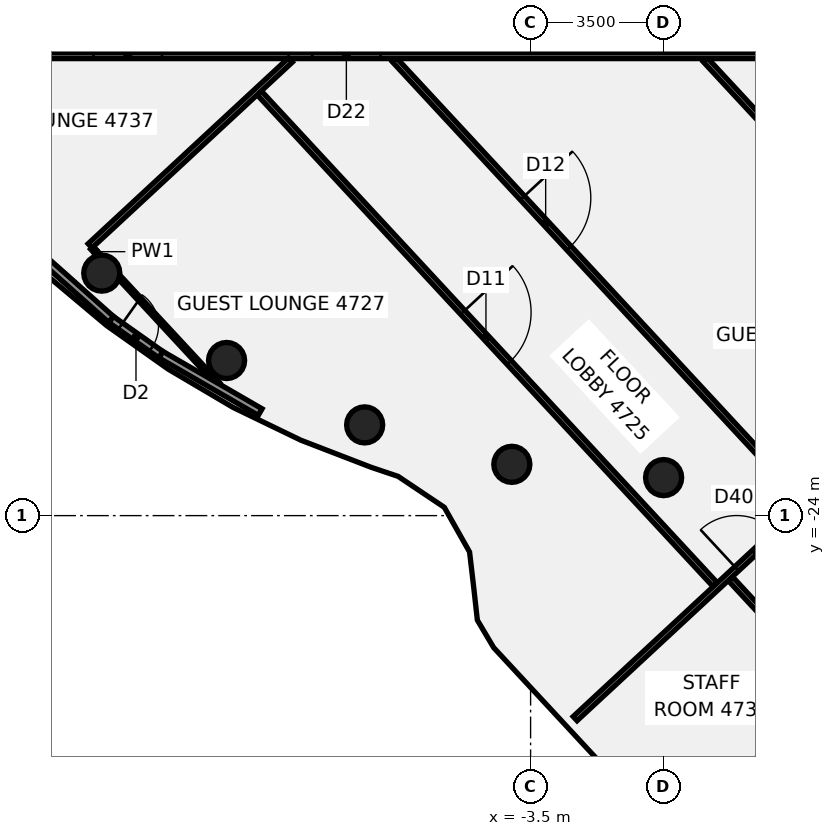
"""IFC4 building model, lengths in metres.
Left out: names, types, materials, properties, quantities, classifications, styles, units other than length and angle.
Written with IfcOpenShell. Run it as: python <this file> out.ifc"""

import sys

from ifc_helpers import new_model, si_unit, direction, frame, frame_2d, origin, origin_2d, place, context, subcontext, project, spatial, rectangle, circle, extrude, element, fill, save


model = new_model("IFC4")
c1 = context("Model", 3, precision=1e-05, world=origin(), true_north=direction((0.0, 1.0)))
c2 = subcontext(c1, "Body", "Model", "MODEL_VIEW")
j1 = project(units=[si_unit("LENGTHUNIT", "METRE"), si_unit("PLANEANGLEUNIT", "RADIAN")], contexts=[c1])
p1 = place(None, origin())
s1 = spatial("IfcSite", under=j1, at=p1, CompositionType="ELEMENT")
p2 = place(p1, origin())
s2 = spatial("IfcBuilding", under=s1, at=p2, CompositionType="ELEMENT")
p3 = place(p2, frame((0.0, 0.0, 189.7)))
s3 = spatial("IfcBuildingStorey", under=s2, at=p3, CompositionType="ELEMENT", Elevation=189.7)
for number, where, z_axis, x_axis in (
    (1, (-14.784, -17.619, -0.14), (0.0, 0.0, 1.0), (1.0, 0.0, 0.0)),
    (2, (-11.5, -19.919, -0.14), (0.0, 0.0, 1.0), (1.0, 0.0, 0.0)),
    (3, (-7.866, -21.613, -0.14), (0.0, 0.0, 1.0), (1.0, 0.0, 0.0)),
    (4, (-3.994, -22.651, -0.14), (0.0, 0.0, 1.0), (1.0, 0.0, 0.0)),
    (5, (0.0, -23.0, -0.14), (0.0, 0.0, 1.0), (1.0, 0.0, 0.0)),
):
    element("IfcColumn", number, at=place(p3, frame(where, z_axis=z_axis, x_axis=x_axis)), inside=s3, PredefinedType="COLUMN", context=c2, shape_type="SweptSolid", body=[
        extrude(circle(Radius=0.475, at=origin_2d()), origin(), (0.0, 0.0, 1.0), 3.6),
    ])
p4 = place(p3, frame((-15.041, -16.956, 0.0), z_axis=(0.0, 0.0, 1.0), x_axis=(0.679895310154, -0.733309189381, 0.0)))
e6 = element("IfcWall", 6, at=p4, inside=s3, PredefinedType="PARTITIONING", context=c2, shape_type="SweptSolid", body=[
    extrude(rectangle(XDim=0.27, YDim=0.1, at=frame_2d((0.135, 0.0))), origin(), (0.0, 0.0, 1.0), 2.864),
])
p5 = place(p3, frame((-14.328, -17.725, 0.0), z_axis=(0.0, 0.0, 1.0), x_axis=(0.679978080858, -0.733232438966, 0.0)))
e7 = element("IfcWall", 7, at=p5, inside=s3, PredefinedType="PARTITIONING", context=c2, shape_type="SweptSolid", body=[
    extrude(rectangle(XDim=3.842, YDim=0.1, at=frame_2d((1.921, 0.0))), origin(), (0.0, 0.0, 1.0), 2.864),
])
p6 = place(p3, frame((-10.638, -12.881, 0.0), z_axis=(0.0, 0.0, 1.0), x_axis=(0.679925356206, -0.733281330724, 0.0)))
e8 = element("IfcWall", 8, at=p6, inside=s3, PredefinedType="PARTITIONING", context=c2, shape_type="SweptSolid", body=[
    extrude(rectangle(XDim=17.639, YDim=0.15, at=frame_2d((8.82, 0.0))), origin(), (0.0, 0.0, 1.0), 2.864),
])
p7 = place(p6, frame((7.87, 0.0, 0.0)))
e9 = element("IfcOpeningElement", 9, at=p7, cuts=e8, PredefinedType="OPENING", context=c2, shape_type="SweptSolid", body=[
    extrude(rectangle(XDim=1.8, YDim=2.1, at=frame_2d((0.9, 1.05))), frame((0.0, 0.085, 0.0), z_axis=(0.0, -1.0, 0.0), x_axis=(1.0, 0.0, 0.0)), (0.0, 0.0, 1.0), 0.17),
])
p8 = place(p3, frame((-7.084, -12.006, 0.0), z_axis=(0.0, 0.0, 1.0), x_axis=(0.679912033417, -0.733293683877, 0.0)))
e10 = element("IfcWall", 10, at=p8, inside=s3, PredefinedType="PARTITIONING", context=c2, shape_type="SweptSolid", body=[
    extrude(rectangle(XDim=15.865, YDim=0.15, at=frame_2d((7.933, 0.0))), origin(), (0.0, 0.0, 1.0), 2.864),
])
p9 = place(p8, frame((4.955, 0.0, 0.0)))
e11 = element("IfcOpeningElement", 11, at=p9, cuts=e10, PredefinedType="OPENING", context=c2, shape_type="SweptSolid", body=[
    extrude(rectangle(XDim=1.8, YDim=2.1, at=frame_2d((0.9, 1.05))), frame((0.0, 0.085, 0.0), z_axis=(0.0, -1.0, 0.0), x_axis=(1.0, 0.0, 0.0)), (0.0, 0.0, 1.0), 0.17),
])
p10 = place(p3, frame((1.098, -12.006, 0.0), z_axis=(0.0, 0.0, 1.0), x_axis=(0.679949372444, -0.733259061255, 0.0)))
e12 = element("IfcWall", 12, at=p10, inside=s3, PredefinedType="PARTITIONING", context=c2, shape_type="SweptSolid", body=[
    extrude(rectangle(XDim=14.843, YDim=0.15, at=frame_2d((7.421, 0.0))), origin(), (0.0, 0.0, 1.0), 2.864),
])
p11 = place(p3, frame((1.758, -25.661, 0.0), z_axis=(0.0, 0.0, 1.0), x_axis=(0.679825753993, -0.733373672972, 0.0)))
e13 = element("IfcWall", 13, at=p11, inside=s3, PredefinedType="PARTITIONING", context=c2, shape_type="SweptSolid", body=[
    extrude(rectangle(XDim=3.88, YDim=0.15, at=frame_2d((1.94, 0.0))), origin(), (0.0, 0.0, 1.0), 2.864),
])
p12 = place(p11, frame((1.87, 0.0, 0.0)))
e14 = element("IfcOpeningElement", 14, at=p12, cuts=e13, PredefinedType="OPENING", context=c2, shape_type="SweptSolid", body=[
    extrude(rectangle(XDim=0.9, YDim=2.1, at=frame_2d((0.45, 1.05))), frame((0.0, 0.085, 0.0), z_axis=(0.0, -1.0, 0.0), x_axis=(1.0, 0.0, 0.0)), (0.0, 0.0, 1.0), 0.17),
])
p13 = place(p3, frame((-17.1, -11.9, 0.0), z_axis=(0.0, 0.0, 1.0), x_axis=(1.0, 0.0, 0.0)))
e15 = element("IfcWall", 15, at=p13, inside=s3, PredefinedType="PARTITIONING", context=c2, shape_type="SweptSolid", body=[
    extrude(rectangle(XDim=34.165, YDim=0.15, at=frame_2d((17.083, 0.0))), origin(), (0.0, 0.0, 1.0), 2.864),
])
p14 = place(p13, frame((7.852, 0.0, 0.0)))
e16 = element("IfcOpeningElement", 16, at=p14, cuts=e15, PredefinedType="OPENING", context=c2, shape_type="SweptSolid", body=[
    extrude(rectangle(XDim=1.8, YDim=2.1, at=frame_2d((0.9, 1.05))), frame((0.0, 0.085, 0.0), z_axis=(0.0, -1.0, 0.0), x_axis=(1.0, 0.0, 0.0)), (0.0, 0.0, 1.0), 0.17),
])
p15 = place(p13, frame((2.1, 0.0, 0.0)))
e17 = element("IfcOpeningElement", 17, at=p15, cuts=e15, PredefinedType="OPENING", context=c2, shape_type="SweptSolid", body=[
    extrude(rectangle(XDim=1.8, YDim=2.1, at=frame_2d((0.9, 1.05))), frame((0.0, 0.085, 0.0), z_axis=(0.0, -1.0, 0.0), x_axis=(1.0, 0.0, 0.0)), (0.0, 0.0, 1.0), 0.17),
])
p16 = place(p13, frame((25.149, 0.0, 0.0)))
e18 = element("IfcOpeningElement", 18, at=p16, cuts=e15, PredefinedType="OPENING", context=c2, shape_type="SweptSolid", body=[
    extrude(rectangle(XDim=1.8, YDim=2.1, at=frame_2d((0.9, 1.05))), frame((0.0, 0.085, 0.0), z_axis=(0.0, -1.0, 0.0), x_axis=(1.0, 0.0, 0.0)), (0.0, 0.0, 1.0), 0.17),
])
p17 = place(p3, frame((-15.092, -16.901, 0.0), z_axis=(0.0, 0.0, 1.0), x_axis=(0.733371254751, 0.67982836268, 0.0)))
e19 = element("IfcWall", 19, at=p17, inside=s3, PredefinedType="PARTITIONING", context=c2, shape_type="SweptSolid", body=[
    extrude(rectangle(XDim=7.191, YDim=0.15, at=frame_2d((3.595, 0.0))), origin(), (0.0, 0.0, 1.0), 2.864),
])
p18 = place(p3, frame((-2.328, -29.342, 0.0), z_axis=(0.0, 0.0, 1.0), x_axis=(0.73323547054, 0.679974811844, 0.0)))
e20 = element("IfcWall", 20, at=p18, inside=s3, PredefinedType="PARTITIONING", context=c2, shape_type="SweptSolid", body=[
    extrude(rectangle(XDim=14.219, YDim=0.15, at=frame_2d((7.11, 0.0))), origin(), (0.0, 0.0, 1.0), 2.864),
])
p19 = place(p18, frame((5.8, 0.0, 0.0)))
e21 = element("IfcOpeningElement", 21, at=p19, cuts=e20, PredefinedType="OPENING", context=c2, shape_type="SweptSolid", body=[
    extrude(rectangle(XDim=1.4, YDim=2.1, at=frame_2d((0.7, 1.05))), frame((0.0, 0.085, 0.0), z_axis=(0.0, -1.0, 0.0), x_axis=(1.0, 0.0, 0.0)), (0.0, 0.0, 1.0), 0.17),
])
p20 = place(p3, frame((-16.794, -16.83, 0.0), z_axis=(0.0, 0.0, 1.0), x_axis=(0.746918793399, -0.664915269841, 0.0)))
e22 = element("IfcWall", 22, at=p20, inside=s3, PredefinedType="SOLIDWALL", context=c2, shape_type="SweptSolid", body=[
    extrude(rectangle(XDim=3.022, YDim=0.2, at=frame_2d((1.511, 0.0))), origin(), (0.0, 0.0, 1.0), 3.46),
])
p21 = place(p3, frame((-13.231, -19.763, 0.0), z_axis=(0.0, 0.0, 1.0), x_axis=(0.865619895442, -0.500701704226, 0.0)))
e23 = element("IfcWall", 23, at=p21, inside=s3, PredefinedType="SOLIDWALL", context=c2, shape_type="SweptSolid", body=[
    extrude(rectangle(XDim=3.021, YDim=0.2, at=frame_2d((1.51, 0.0))), origin(), (0.0, 0.0, 1.0), 3.46),
])
p22 = place(p3, frame((-14.537, -18.839, 0.0), z_axis=(0.0, 0.0, 1.0), x_axis=(0.816282280001, -0.577653217212, 0.0)))
e24 = element("IfcWall", 24, at=p22, inside=s3, PredefinedType="SOLIDWALL", context=c2, shape_type="SweptSolid", body=[
    extrude(rectangle(XDim=1.6, YDim=0.2, at=frame_2d((0.8, 0.0))), origin(), (0.0, 0.0, 1.0), 3.46),
])
p23 = place(p22, frame((0.3, 0.0, 0.0)))
e25 = element("IfcOpeningElement", 25, at=p23, cuts=e24, PredefinedType="OPENING", context=c2, shape_type="SweptSolid", body=[
    extrude(rectangle(XDim=1.0, YDim=2.4, at=frame_2d((0.5, 1.2))), frame((0.0, 0.11, 0.0), z_axis=(0.0, -1.0, 0.0), x_axis=(1.0, 0.0, 0.0)), (0.0, 0.0, 1.0), 0.22),
])
p24 = place(p3, frame((1.998, -30.921, -0.14), z_axis=(0.0, 0.0, 1.0), x_axis=(0.733268848454, 0.679938817753, 0.0)))
e26 = element("IfcWall", 26, at=p24, inside=s3, PredefinedType="SHEAR", context=c2, shape_type="SweptSolid", body=[
    extrude(rectangle(XDim=3.2, YDim=0.2, at=frame_2d((1.6, 0.0))), origin(), (0.0, 0.0, 1.0), 3.004),
])
p25 = place(p7, frame((1.8, 0.0, 0.0), z_axis=(0.0, 0.0, 1.0), x_axis=(-1.0, 0.0, 0.0)))
e27 = element("IfcDoor", 27, at=p25, inside=s3, OperationType="DOUBLE_DOOR_SINGLE_SWING", PredefinedType="DOOR", context=c2, shape_type="SweptSolid", body=[
    extrude(rectangle(XDim=1.8, YDim=2.1, at=frame_2d((0.9, 1.05))), frame((0.0, 0.025, 0.0), z_axis=(0.0, -1.0, 0.0), x_axis=(1.0, 0.0, 0.0)), (0.0, 0.0, 1.0), 0.05),
])
fill(e9, e27)
p26 = place(p9, origin())
e28 = element("IfcDoor", 28, at=p26, inside=s3, OperationType="DOUBLE_DOOR_SINGLE_SWING", PredefinedType="DOOR", context=c2, shape_type="SweptSolid", body=[
    extrude(rectangle(XDim=1.8, YDim=2.1, at=frame_2d((0.9, 1.05))), frame((0.0, 0.025, 0.0), z_axis=(0.0, -1.0, 0.0), x_axis=(1.0, 0.0, 0.0)), (0.0, 0.0, 1.0), 0.05),
])
fill(e11, e28)
p27 = place(p14, origin())
e29 = element("IfcDoor", 29, at=p27, inside=s3, OperationType="DOUBLE_DOOR_SINGLE_SWING", PredefinedType="DOOR", context=c2, shape_type="SweptSolid", body=[
    extrude(rectangle(XDim=1.8, YDim=2.1, at=frame_2d((0.9, 1.05))), frame((0.0, 0.025, 0.0), z_axis=(0.0, -1.0, 0.0), x_axis=(1.0, 0.0, 0.0)), (0.0, 0.0, 1.0), 0.05),
])
fill(e16, e29)
p28 = place(p15, frame((1.8, 0.0, 0.0), z_axis=(0.0, 0.0, 1.0), x_axis=(-1.0, 0.0, 0.0)))
e30 = element("IfcDoor", 30, at=p28, inside=s3, OperationType="DOUBLE_DOOR_SINGLE_SWING", PredefinedType="DOOR", context=c2, shape_type="SweptSolid", body=[
    extrude(rectangle(XDim=1.8, YDim=2.1, at=frame_2d((0.9, 1.05))), frame((0.0, 0.025, 0.0), z_axis=(0.0, -1.0, 0.0), x_axis=(1.0, 0.0, 0.0)), (0.0, 0.0, 1.0), 0.05),
])
fill(e17, e30)
p29 = place(p19, origin())
e31 = element("IfcDoor", 31, at=p29, inside=s3, OperationType="DOUBLE_DOOR_SINGLE_SWING", PredefinedType="DOOR", context=c2, shape_type="SweptSolid", body=[
    extrude(rectangle(XDim=1.4, YDim=2.1, at=frame_2d((0.7, 1.05))), frame((0.0, 0.025, 0.0), z_axis=(0.0, -1.0, 0.0), x_axis=(1.0, 0.0, 0.0)), (0.0, 0.0, 1.0), 0.05),
])
fill(e21, e31)
p30 = place(p23, origin())
e32 = element("IfcDoor", 32, at=p30, inside=s3, OperationType="SINGLE_SWING_LEFT", PredefinedType="DOOR", context=c2, shape_type="SweptSolid", body=[
    extrude(rectangle(XDim=1.0, YDim=2.4, at=frame_2d((0.5, 1.2))), frame((0.0, 0.025, 0.0), z_axis=(0.0, -1.0, 0.0), x_axis=(1.0, 0.0, 0.0)), (0.0, 0.0, 1.0), 0.05),
])
fill(e25, e32)
save(model, sys.argv[1])
